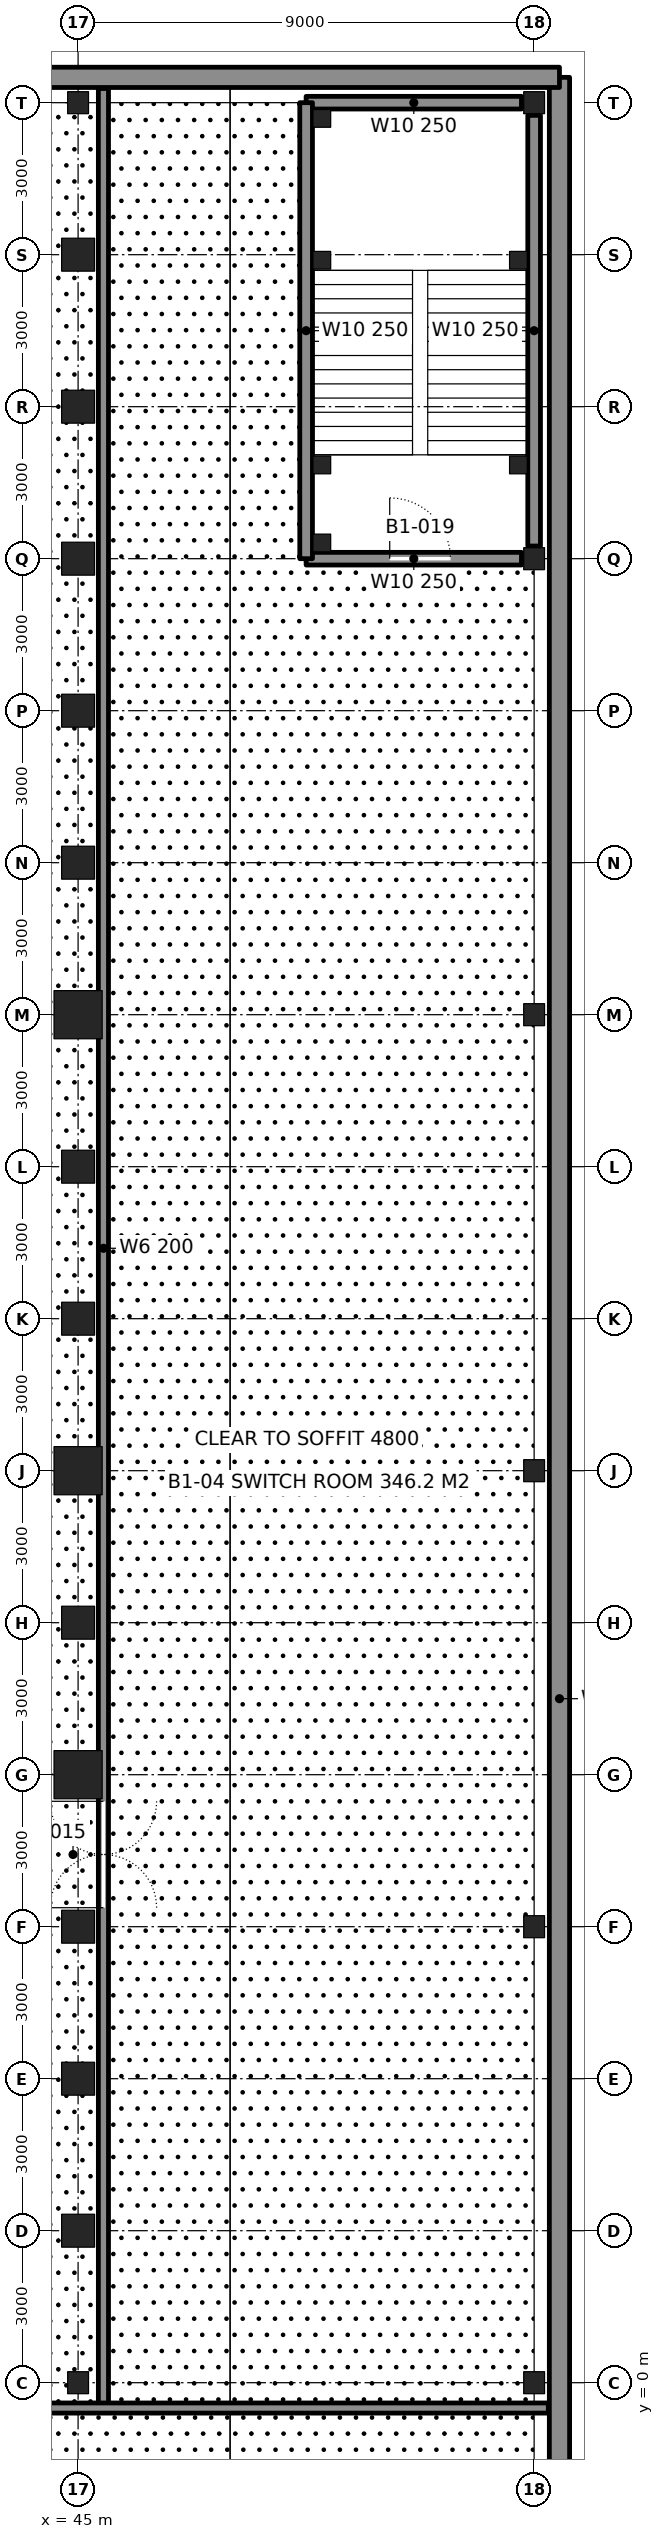
"""IFC4 building model, lengths in metres.
Left out: names, types, materials, properties, quantities, classifications, styles, units other than length and angle.
Written with IfcOpenShell. Run it as: python <this file> out.ifc"""

import sys

from ifc_helpers import new_model, si_unit, direction, frame, frame_2d, origin, origin_2d, place, context, subcontext, project, spatial, rectangle, hollow_rectangle, i_section, extrude, element, fill, save


model = new_model("IFC4")
c1 = context("Model", 3, precision=1e-05, world=origin(), true_north=direction((0.0, 1.0)))
c2 = subcontext(c1, "Body", "Model", "MODEL_VIEW")
j1 = project(units=[si_unit("LENGTHUNIT", "METRE"), si_unit("PLANEANGLEUNIT", "RADIAN")], contexts=[c1])
p1 = place(None, origin())
s1 = spatial("IfcSite", under=j1, at=p1, CompositionType="ELEMENT")
p2 = place(p1, origin())
s2 = spatial("IfcBuilding", under=s1, at=p2, CompositionType="ELEMENT")
p3 = place(p2, frame((0.0, 0.0, -5.0)))
s3 = spatial("IfcBuildingStorey", under=s2, at=p3, CompositionType="ELEMENT", Elevation=-5.0)
for number, where, z_axis, x_axis in (
    (1, (45.0, 3.0, -0.3), (0.0, 0.0, 1.0), (1.0, 0.0, 0.0)),
    (2, (45.0, 6.0, -0.3), (0.0, 0.0, 1.0), (1.0, 0.0, 0.0)),
    (3, (45.0, 9.0, -0.3), (0.0, 0.0, 1.0), (1.0, 0.0, 0.0)),
):
    element("IfcColumn", number, at=place(p3, frame(where, z_axis=z_axis, x_axis=x_axis)), inside=s3, PredefinedType="COLUMN", context=c2, shape_type="SweptSolid", body=[
        extrude(hollow_rectangle(XDim=0.65, YDim=0.65, WallThickness=0.065, at=origin_2d()), origin(), (0.0, 0.0, 1.0), 5.3),
    ])
p4 = place(p3, frame((45.0, 12.0, -0.3), z_axis=(0.0, 0.0, 1.0), x_axis=(1.0, 0.0, 0.0)))
e4 = element("IfcColumn", 4, at=p4, inside=s3, PredefinedType="COLUMN", context=c2, shape_type="SweptSolid", body=[
    extrude(hollow_rectangle(XDim=0.95, YDim=0.95, WallThickness=0.11, at=origin_2d()), origin(), (0.0, 0.0, 1.0), 5.3),
])
p5 = place(p3, frame((45.0, 15.0, -0.3), z_axis=(0.0, 0.0, 1.0), x_axis=(1.0, 0.0, 0.0)))
e5 = element("IfcColumn", 5, at=p5, inside=s3, PredefinedType="COLUMN", context=c2, shape_type="SweptSolid", body=[
    extrude(hollow_rectangle(XDim=0.65, YDim=0.65, WallThickness=0.065, at=origin_2d()), origin(), (0.0, 0.0, 1.0), 5.3),
])
p6 = place(p3, frame((45.0, 18.0, -0.3), z_axis=(0.0, 0.0, 1.0), x_axis=(1.0, 0.0, 0.0)))
e6 = element("IfcColumn", 6, at=p6, inside=s3, PredefinedType="COLUMN", context=c2, shape_type="SweptSolid", body=[
    extrude(hollow_rectangle(XDim=0.95, YDim=0.95, WallThickness=0.11, at=origin_2d()), origin(), (0.0, 0.0, 1.0), 5.3),
])
for number, where, z_axis, x_axis in (
    (7, (45.0, 21.0, -0.3), (0.0, 0.0, 1.0), (1.0, 0.0, 0.0)),
    (8, (45.0, 24.0, -0.3), (0.0, 0.0, 1.0), (1.0, 0.0, 0.0)),
):
    element("IfcColumn", number, at=place(p3, frame(where, z_axis=z_axis, x_axis=x_axis)), inside=s3, PredefinedType="COLUMN", context=c2, shape_type="SweptSolid", body=[
        extrude(hollow_rectangle(XDim=0.65, YDim=0.65, WallThickness=0.065, at=origin_2d()), origin(), (0.0, 0.0, 1.0), 5.3),
    ])
p7 = place(p3, frame((45.0, 27.0, -0.3), z_axis=(0.0, 0.0, 1.0), x_axis=(1.0, 0.0, 0.0)))
e9 = element("IfcColumn", 9, at=p7, inside=s3, PredefinedType="COLUMN", context=c2, shape_type="SweptSolid", body=[
    extrude(hollow_rectangle(XDim=0.95, YDim=0.95, WallThickness=0.11, at=origin_2d()), origin(), (0.0, 0.0, 1.0), 5.3),
])
for number, where, z_axis, x_axis in (
    (10, (45.0, 30.0, -0.3), (0.0, 0.0, 1.0), (1.0, 0.0, 0.0)),
    (11, (45.0, 33.0, -0.3), (0.0, 0.0, 1.0), (1.0, 0.0, 0.0)),
    (12, (45.0, 36.0, -0.3), (0.0, 0.0, 1.0), (1.0, 0.0, 0.0)),
    (13, (45.0, 39.0, -0.3), (0.0, 0.0, 1.0), (1.0, 0.0, 0.0)),
    (14, (45.0, 42.0, -0.3), (0.0, 0.0, 1.0), (1.0, 0.0, 0.0)),
):
    element("IfcColumn", number, at=place(p3, frame(where, z_axis=z_axis, x_axis=x_axis)), inside=s3, PredefinedType="COLUMN", context=c2, shape_type="SweptSolid", body=[
        extrude(hollow_rectangle(XDim=0.65, YDim=0.65, WallThickness=0.065, at=origin_2d()), origin(), (0.0, 0.0, 1.0), 5.3),
    ])
for number, where, z_axis, x_axis in (
    (15, (45.0, 0.0, -0.3), (0.0, 0.0, 1.0), (1.0, 0.0, 0.0)),
    (16, (45.0, 45.0, -0.3), (0.0, 0.0, 1.0), (1.0, 0.0, 0.0)),
    (17, (54.0, 0.0, -0.3), (0.0, 0.0, 1.0), (1.0, 0.0, 0.0)),
    (18, (54.0, 9.0, -0.3), (0.0, 0.0, 1.0), (1.0, 0.0, 0.0)),
    (19, (54.0, 18.0, -0.3), (0.0, 0.0, 1.0), (1.0, 0.0, 0.0)),
    (20, (54.0, 27.0, -0.3), (0.0, 0.0, 1.0), (1.0, 0.0, 0.0)),
    (21, (54.0, 36.0, -0.3), (0.0, 0.0, 1.0), (1.0, 0.0, 0.0)),
    (22, (54.0, 45.0, -0.3), (0.0, 0.0, 1.0), (1.0, 0.0, 0.0)),
):
    element("IfcColumn", number, at=place(p3, frame(where, z_axis=z_axis, x_axis=x_axis)), inside=s3, PredefinedType="COLUMN", context=c2, shape_type="SweptSolid", body=[
        extrude(i_section(OverallWidth=0.411, OverallDepth=0.434, WebThickness=0.036, FlangeThickness=0.057, at=origin_2d()), origin(), (0.0, 0.0, 1.0), 5.3),
    ])
for number, where, z_axis, x_axis in (
    (23, (54.5, -18.5, -0.3), (0.0, 0.0, 1.0), (0.0, 1.0, 0.0)),
    (24, (54.5, 45.5, -0.3), (0.0, 0.0, 1.0), (-1.0, 0.0, 0.0)),
):
    element("IfcWall", number, at=place(p3, frame(where, z_axis=z_axis, x_axis=x_axis)), inside=s3, PredefinedType="USERDEFINED", context=c2, shape_type="SweptSolid", body=[
        extrude(rectangle(XDim=64.0, YDim=0.4, at=frame_2d((32.0, 0.0))), origin(), (0.0, 0.0, 1.0), 5.1),
    ])
p8 = place(p3, frame((45.5, -0.5, 0.0), z_axis=(0.0, 0.0, 1.0), x_axis=(0.0, 1.0, 0.0)))
e25 = element("IfcWall", 25, at=p8, inside=s3, PredefinedType="PARTITIONING", context=c2, shape_type="SweptSolid", body=[
    extrude(rectangle(XDim=45.78, YDim=0.2, at=frame_2d((22.89, 0.0))), origin(), (0.0, 0.0, 1.0), 4.8),
])
p9 = place(p8, frame((9.875, 0.0, 0.0)))
e26 = element("IfcOpeningElement", 26, at=p9, cuts=e25, PredefinedType="OPENING", context=c2, shape_type="SweptSolid", body=[
    extrude(rectangle(XDim=2.1, YDim=2.4, at=frame_2d((1.05, 1.2))), frame((0.0, 0.11, 0.0), z_axis=(0.0, -1.0, 0.0), x_axis=(1.0, 0.0, 0.0)), (0.0, 0.0, 1.0), 0.22),
])
p10 = place(p3, frame((-9.28, -0.5, 0.0), z_axis=(0.0, 0.0, 1.0), x_axis=(1.0, 0.0, 0.0)))
e27 = element("IfcWall", 27, at=p10, inside=s3, PredefinedType="PARTITIONING", context=c2, shape_type="SweptSolid", body=[
    extrude(rectangle(XDim=63.56, YDim=0.2, at=frame_2d((31.78, 0.0))), origin(), (0.0, 0.0, 1.0), 4.8),
])
p11 = place(p10, frame((12.73, 0.0, 0.0)))
e28 = element("IfcOpeningElement", 28, at=p11, cuts=e27, PredefinedType="OPENING", context=c2, shape_type="SweptSolid", body=[
    extrude(rectangle(XDim=2.1, YDim=2.4, at=frame_2d((1.05, 1.2))), frame((0.0, 0.11, 0.0), z_axis=(0.0, -1.0, 0.0), x_axis=(1.0, 0.0, 0.0)), (0.0, 0.0, 1.0), 0.22),
])
p12 = place(p10, frame((48.73, 0.0, 0.0)))
e29 = element("IfcOpeningElement", 29, at=p12, cuts=e27, PredefinedType="OPENING", context=c2, shape_type="SweptSolid", body=[
    extrude(rectangle(XDim=2.1, YDim=2.4, at=frame_2d((1.05, 1.2))), frame((0.0, 0.11, 0.0), z_axis=(0.0, -1.0, 0.0), x_axis=(1.0, 0.0, 0.0)), (0.0, 0.0, 1.0), 0.22),
])
p13 = place(p3, frame((49.5, 36.0, 0.0), z_axis=(0.0, 0.0, 1.0), x_axis=(1.0, 0.0, 0.0)))
e30 = element("IfcWall", 30, at=p13, inside=s3, PredefinedType="SOLIDWALL", context=c2, shape_type="SweptSolid", body=[
    extrude(rectangle(XDim=4.25, YDim=0.25, at=frame_2d((2.125, 0.0))), origin(), (0.0, 0.0, 1.0), 3.853),
])
p14 = place(p13, frame((1.65, 0.0, 0.0)))
e31 = element("IfcOpeningElement", 31, at=p14, cuts=e30, PredefinedType="OPENING", context=c2, shape_type="SweptSolid", body=[
    extrude(rectangle(XDim=1.2, YDim=2.1, at=frame_2d((0.6, 1.05))), frame((0.0, 0.135, 0.0), z_axis=(0.0, -1.0, 0.0), x_axis=(1.0, 0.0, 0.0)), (0.0, 0.0, 1.0), 0.27),
])
p15 = place(p3, frame((54.0, 36.25, 0.0), z_axis=(0.0, 0.0, 1.0), x_axis=(0.0, 1.0, 0.0)))
e32 = element("IfcWall", 32, at=p15, inside=s3, PredefinedType="SOLIDWALL", context=c2, shape_type="SweptSolid", body=[
    extrude(rectangle(XDim=8.5, YDim=0.25, at=frame_2d((4.25, 0.0))), origin(), (0.0, 0.0, 1.0), 3.853),
])
p16 = place(p3, frame((49.5, 45.0, 0.0), z_axis=(0.0, 0.0, 1.0), x_axis=(1.0, 0.0, 0.0)))
e33 = element("IfcWall", 33, at=p16, inside=s3, PredefinedType="SOLIDWALL", context=c2, shape_type="SweptSolid", body=[
    extrude(rectangle(XDim=4.25, YDim=0.25, at=frame_2d((2.125, 0.0))), origin(), (0.0, 0.0, 1.0), 3.853),
])
p17 = place(p3, frame((49.5, 36.0, 0.0), z_axis=(0.0, 0.0, 1.0), x_axis=(0.0, 1.0, 0.0)))
e34 = element("IfcWall", 34, at=p17, inside=s3, PredefinedType="SOLIDWALL", context=c2, shape_type="SweptSolid", body=[
    extrude(rectangle(XDim=9.0, YDim=0.25, at=frame_2d((4.5, 0.0))), origin(), (0.0, 0.0, 1.0), 3.853),
])
for number, where, z_axis, x_axis in (
    (35, (49.81, 44.69, -0.3), (0.0, 0.0, 1.0), (1.0, 0.0, 0.0)),
    (36, (49.81, 41.89, -0.3), (0.0, 0.0, 1.0), (1.0, 0.0, 0.0)),
    (37, (53.69, 41.89, -0.3), (0.0, 0.0, 1.0), (1.0, 0.0, 0.0)),
    (38, (49.81, 37.85, -0.3), (0.0, 0.0, 1.0), (1.0, 0.0, 0.0)),
    (39, (53.69, 37.85, -0.3), (0.0, 0.0, 1.0), (1.0, 0.0, 0.0)),
    (40, (49.81, 36.31, -0.3), (0.0, 0.0, 1.0), (1.0, 0.0, 0.0)),
):
    element("IfcColumn", number, at=place(p3, frame(where, z_axis=z_axis, x_axis=x_axis)), inside=s3, PredefinedType="COLUMN", context=c2, shape_type="SweptSolid", body=[
        extrude(hollow_rectangle(XDim=0.35, YDim=0.35, WallThickness=0.035, at=origin_2d()), origin(), (0.0, 0.0, 1.0), 5.3),
    ])
p18 = place(p9, origin())
e41 = element("IfcDoor", 41, at=p18, inside=s3, OperationType="DOUBLE_DOOR_DOUBLE_SWING", PredefinedType="DOOR", context=c2, shape_type="SweptSolid", body=[
    extrude(rectangle(XDim=2.1, YDim=2.4, at=frame_2d((1.05, 1.2))), frame((0.0, 0.025, 0.0), z_axis=(0.0, -1.0, 0.0), x_axis=(1.0, 0.0, 0.0)), (0.0, 0.0, 1.0), 0.05),
])
fill(e26, e41)
p19 = place(p14, origin())
e42 = element("IfcDoor", 42, at=p19, inside=s3, OperationType="SINGLE_SWING_LEFT", PredefinedType="DOOR", context=c2, shape_type="SweptSolid", body=[
    extrude(rectangle(XDim=1.2, YDim=2.1, at=frame_2d((0.6, 1.05))), frame((0.0, 0.025, 0.0), z_axis=(0.0, -1.0, 0.0), x_axis=(1.0, 0.0, 0.0)), (0.0, 0.0, 1.0), 0.05),
])
fill(e31, e42)
save(model, sys.argv[1])
